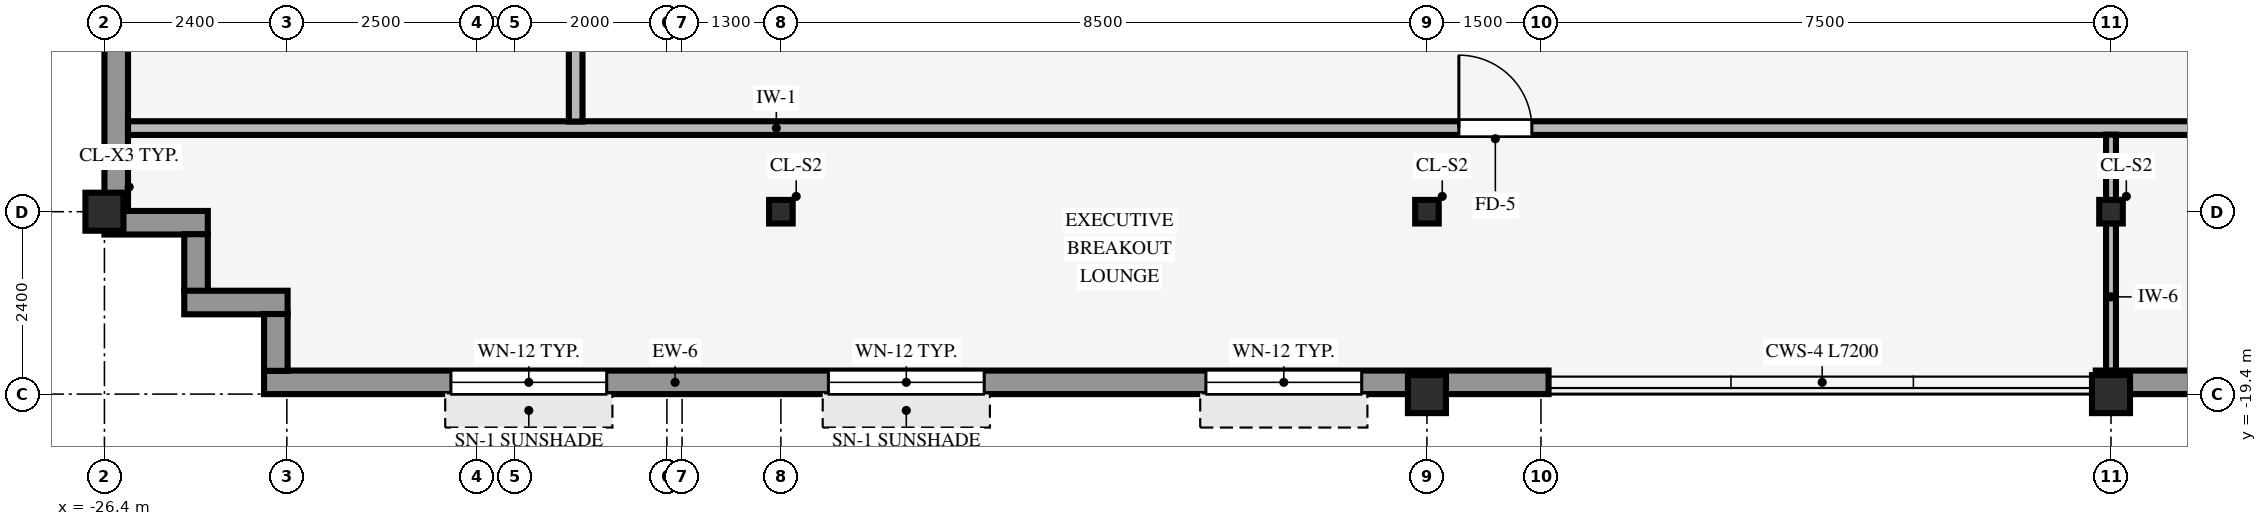
"""IFC4 building model, lengths in metres.
Left out: names, types, materials, properties, quantities, classifications, styles, units other than length and angle.
Written with IfcOpenShell. Run it as: python <this file> out.ifc"""

import sys

from ifc_helpers import new_model, si_unit, direction, frame, frame_2d, origin, origin_2d, place, context, subcontext, project, spatial, rectangle, hollow_rectangle, i_section, extrude, source, transform, mapped, element, fill, save


model = new_model("IFC4")
c1 = context("Model", 3, precision=1e-05, world=origin(), true_north=direction((0.0, 1.0)))
c2 = subcontext(c1, "Body", "Model", "MODEL_VIEW")
j1 = project(units=[si_unit("LENGTHUNIT", "METRE"), si_unit("PLANEANGLEUNIT", "RADIAN")], contexts=[c1])
p1 = place(None, origin())
s1 = spatial("IfcSite", under=j1, at=p1, CompositionType="ELEMENT")
p2 = place(p1, origin())
s2 = spatial("IfcBuilding", under=s1, at=p2, CompositionType="ELEMENT")
p3 = place(p2, frame((0.0, 0.0, 223.75)))
s3 = spatial("IfcBuildingStorey", under=s2, at=p3, CompositionType="ELEMENT", Elevation=223.75)
for number, where, z_axis, x_axis in (
    (1, (-26.4, -17.0, 0.0), (0.0, 0.0, 1.0), (1.0, 0.0, 0.0)),
    (2, (-9.0, -19.4, 0.0), (0.0, 0.0, 1.0), (1.0, 0.0, 0.0)),
    (3, (0.0, -19.4, 0.0), (0.0, 0.0, 1.0), (1.0, 0.0, 0.0)),
):
    element("IfcColumn", number, at=place(p3, frame(where, z_axis=z_axis, x_axis=x_axis)), inside=s3, PredefinedType="COLUMN", context=c2, shape_type="SweptSolid", body=[
        extrude(hollow_rectangle(XDim=0.5, YDim=0.5, WallThickness=0.032, InnerFilletRadius=0.032, OuterFilletRadius=0.064, at=origin_2d()), origin(), (0.0, 0.0, 1.0), 3.37),
    ])
for number, where, z_axis, x_axis in (
    (4, (0.0, -17.0, 0.0), (0.0, 0.0, 1.0), (1.0, 0.0, 0.0)),
    (5, (-17.5, -17.0, 0.0), (0.0, 0.0, 1.0), (1.0, 0.0, 0.0)),
    (6, (-9.0, -17.0, 0.0), (0.0, 0.0, 1.0), (1.0, 0.0, 0.0)),
):
    element("IfcColumn", number, at=place(p3, frame(where, z_axis=z_axis, x_axis=x_axis)), inside=s3, PredefinedType="COLUMN", context=c2, shape_type="SweptSolid", body=[
        extrude(i_section(OverallWidth=0.31, OverallDepth=0.31, WebThickness=0.015, FlangeThickness=0.015, FilletRadius=0.015, at=origin_2d()), origin(), (0.0, 0.0, 1.0), 3.37),
    ])
p4 = place(p3, frame((-24.3, -19.245, 0.0), z_axis=(0.0, 0.0, 1.0), x_axis=(1.0, 0.0, 0.0)))
e7 = element("IfcWall", 7, at=p4, inside=s3, PredefinedType="STANDARD", context=c2, shape_type="SweptSolid", body=[
    extrude(rectangle(XDim=16.9, YDim=0.31, at=frame_2d((8.45, 0.0))), origin(), (0.0, 0.0, 1.0), 2.705),
])
p5 = place(p4, frame((2.458, 0.0, 0.8)))
e8 = element("IfcOpeningElement", 8, at=p5, cuts=e7, PredefinedType="OPENING", context=c2, shape_type="SweptSolid", body=[
    extrude(rectangle(XDim=2.05, YDim=1.52, at=frame_2d((1.025, 0.76))), frame((0.0, 0.165, 0.0), z_axis=(0.0, -1.0, 0.0), x_axis=(1.0, 0.0, 0.0)), (0.0, 0.0, 1.0), 0.33),
])
p6 = place(p4, frame((7.425, 0.0, 0.8)))
e9 = element("IfcOpeningElement", 9, at=p6, cuts=e7, PredefinedType="OPENING", context=c2, shape_type="SweptSolid", body=[
    extrude(rectangle(XDim=2.05, YDim=1.52, at=frame_2d((1.025, 0.76))), frame((0.0, 0.165, 0.0), z_axis=(0.0, -1.0, 0.0), x_axis=(1.0, 0.0, 0.0)), (0.0, 0.0, 1.0), 0.33),
])
p7 = place(p4, frame((12.392, 0.0, 0.8)))
e10 = element("IfcOpeningElement", 10, at=p7, cuts=e7, PredefinedType="OPENING", context=c2, shape_type="SweptSolid", body=[
    extrude(rectangle(XDim=2.05, YDim=1.52, at=frame_2d((1.025, 0.76))), frame((0.0, 0.165, 0.0), z_axis=(0.0, -1.0, 0.0), x_axis=(1.0, 0.0, 0.0)), (0.0, 0.0, 1.0), 0.33),
])
p8 = place(p3, frame((-0.2, -19.245, 0.0), z_axis=(0.0, 0.0, 1.0), x_axis=(1.0, 0.0, 0.0)))
e11 = element("IfcWall", 11, at=p8, inside=s3, PredefinedType="STANDARD", context=c2, shape_type="SweptSolid", body=[
    extrude(rectangle(XDim=16.9, YDim=0.31, at=frame_2d((8.45, 0.0))), origin(), (0.0, 0.0, 1.0), 2.705),
])
p9 = place(p8, frame((2.458, 0.0, 0.8)))
e12 = element("IfcOpeningElement", 12, at=p9, cuts=e11, PredefinedType="OPENING", context=c2, shape_type="SweptSolid", body=[
    extrude(rectangle(XDim=2.05, YDim=1.52, at=frame_2d((1.025, 0.76))), frame((0.0, 0.165, 0.0), z_axis=(0.0, -1.0, 0.0), x_axis=(1.0, 0.0, 0.0)), (0.0, 0.0, 1.0), 0.33),
])
p10 = place(p8, frame((6.075, 0.0, 0.8)))
e13 = element("IfcOpeningElement", 13, at=p10, cuts=e11, PredefinedType="OPENING", context=c2, shape_type="SweptSolid", body=[
    extrude(rectangle(XDim=2.05, YDim=1.52, at=frame_2d((1.025, 0.76))), frame((0.0, 0.165, 0.0), z_axis=(0.0, -1.0, 0.0), x_axis=(1.0, 0.0, 0.0)), (0.0, 0.0, 1.0), 0.33),
])
p11 = place(p8, frame((12.392, 0.0, 0.8)))
e14 = element("IfcOpeningElement", 14, at=p11, cuts=e11, PredefinedType="OPENING", context=c2, shape_type="SweptSolid", body=[
    extrude(rectangle(XDim=2.05, YDim=1.52, at=frame_2d((1.025, 0.76))), frame((0.0, 0.165, 0.0), z_axis=(0.0, -1.0, 0.0), x_axis=(1.0, 0.0, 0.0)), (0.0, 0.0, 1.0), 0.33),
])
p12 = place(p3, frame((-26.245, -16.994, 0.0), z_axis=(0.0, 0.0, 1.0), x_axis=(0.0, 1.0, 0.0)))
e15 = element("IfcWall", 15, at=p12, inside=s3, PredefinedType="STANDARD", context=c2, shape_type="SweptSolid", body=[
    extrude(rectangle(XDim=33.988, YDim=0.31, at=frame_2d((16.994, 0.0))), origin(), (0.0, 0.0, 1.0), 2.705),
])
p13 = place(p12, frame((21.194, 0.0, 0.0)))
e16 = element("IfcOpeningElement", 16, at=p13, cuts=e15, PredefinedType="OPENING", context=c2, shape_type="SweptSolid", body=[
    extrude(rectangle(XDim=1.05, YDim=2.1, at=frame_2d((0.525, 1.05))), frame((0.0, 0.165, 0.0), z_axis=(0.0, -1.0, 0.0), x_axis=(1.0, 0.0, 0.0)), (0.0, 0.0, 1.0), 0.33),
])
p14 = place(p12, frame((2.66, 0.0, 0.8)))
e17 = element("IfcOpeningElement", 17, at=p14, cuts=e15, PredefinedType="OPENING", context=c2, shape_type="SweptSolid", body=[
    extrude(rectangle(XDim=1.25, YDim=1.52, at=frame_2d((0.625, 0.76))), frame((0.0, 0.165, 0.0), z_axis=(0.0, -1.0, 0.0), x_axis=(1.0, 0.0, 0.0)), (0.0, 0.0, 1.0), 0.33),
])
p15 = place(p12, frame((8.13, 0.0, 0.8)))
e18 = element("IfcOpeningElement", 18, at=p15, cuts=e15, PredefinedType="OPENING", context=c2, shape_type="SweptSolid", body=[
    extrude(rectangle(XDim=1.25, YDim=1.52, at=frame_2d((0.625, 0.76))), frame((0.0, 0.165, 0.0), z_axis=(0.0, -1.0, 0.0), x_axis=(1.0, 0.0, 0.0)), (0.0, 0.0, 1.0), 0.33),
])
p16 = place(p12, frame((11.799, 0.0, 0.8)))
e19 = element("IfcOpeningElement", 19, at=p16, cuts=e15, PredefinedType="OPENING", context=c2, shape_type="SweptSolid", body=[
    extrude(rectangle(XDim=1.25, YDim=1.52, at=frame_2d((0.625, 0.76))), frame((0.0, 0.165, 0.0), z_axis=(0.0, -1.0, 0.0), x_axis=(1.0, 0.0, 0.0)), (0.0, 0.0, 1.0), 0.33),
])
p17 = place(p12, frame((17.719, 0.0, 0.8)))
e20 = element("IfcOpeningElement", 20, at=p17, cuts=e15, PredefinedType="OPENING", context=c2, shape_type="SweptSolid", body=[
    extrude(rectangle(XDim=1.25, YDim=1.52, at=frame_2d((0.625, 0.76))), frame((0.0, 0.165, 0.0), z_axis=(0.0, -1.0, 0.0), x_axis=(1.0, 0.0, 0.0)), (0.0, 0.0, 1.0), 0.33),
])
p18 = place(p12, frame((19.589, 0.0, 0.8)))
e21 = element("IfcOpeningElement", 21, at=p18, cuts=e15, PredefinedType="OPENING", context=c2, shape_type="SweptSolid", body=[
    extrude(rectangle(XDim=1.25, YDim=1.52, at=frame_2d((0.625, 0.76))), frame((0.0, 0.165, 0.0), z_axis=(0.0, -1.0, 0.0), x_axis=(1.0, 0.0, 0.0)), (0.0, 0.0, 1.0), 0.33),
])
p19 = place(p12, frame((24.608, 0.0, 0.8)))
e22 = element("IfcOpeningElement", 22, at=p19, cuts=e15, PredefinedType="OPENING", context=c2, shape_type="SweptSolid", body=[
    extrude(rectangle(XDim=1.25, YDim=1.52, at=frame_2d((0.625, 0.76))), frame((0.0, 0.165, 0.0), z_axis=(0.0, -1.0, 0.0), x_axis=(1.0, 0.0, 0.0)), (0.0, 0.0, 1.0), 0.33),
])
p20 = place(p12, frame((30.078, 0.0, 0.8)))
e23 = element("IfcOpeningElement", 23, at=p20, cuts=e15, PredefinedType="OPENING", context=c2, shape_type="SweptSolid", body=[
    extrude(rectangle(XDim=1.25, YDim=1.52, at=frame_2d((0.625, 0.76))), frame((0.0, 0.165, 0.0), z_axis=(0.0, -1.0, 0.0), x_axis=(1.0, 0.0, 0.0)), (0.0, 0.0, 1.0), 0.33),
])
p21 = place(p3, frame((-26.4, -17.145, 0.0), z_axis=(0.0, 0.0, 1.0), x_axis=(1.0, 0.0, 0.0)))
e24 = element("IfcWall", 24, at=p21, inside=s3, PredefinedType="STANDARD", context=c2, shape_type="SweptSolid", body=[
    extrude(rectangle(XDim=1.36, YDim=0.31, at=frame_2d((0.68, 0.0))), origin(), (0.0, 0.0, 1.0), 2.892),
])
p22 = place(p3, frame((-25.195, -18.044, 0.0), z_axis=(0.0, 0.0, 1.0), x_axis=(0.0, 1.0, 0.0)))
e25 = element("IfcWall", 25, at=p22, inside=s3, PredefinedType="STANDARD", context=c2, shape_type="SweptSolid", body=[
    extrude(rectangle(XDim=0.748, YDim=0.31, at=frame_2d((0.374, 0.0))), origin(), (0.0, 0.0, 1.0), 2.892),
])
p23 = place(p3, frame((-25.35, -18.195, 0.0), z_axis=(0.0, 0.0, 1.0), x_axis=(1.0, 0.0, 0.0)))
e26 = element("IfcWall", 26, at=p23, inside=s3, PredefinedType="STANDARD", context=c2, shape_type="SweptSolid", body=[
    extrude(rectangle(XDim=1.36, YDim=0.31, at=frame_2d((0.68, 0.0))), origin(), (0.0, 0.0, 1.0), 2.892),
])
p24 = place(p3, frame((-24.145, -19.094, 0.0), z_axis=(0.0, 0.0, 1.0), x_axis=(0.0, 1.0, 0.0)))
e27 = element("IfcWall", 27, at=p24, inside=s3, PredefinedType="STANDARD", context=c2, shape_type="SweptSolid", body=[
    extrude(rectangle(XDim=0.748, YDim=0.31, at=frame_2d((0.374, 0.0))), origin(), (0.0, 0.0, 1.0), 2.892),
])
p25 = place(p3, frame((-26.09, -15.9, 0.0), z_axis=(0.0, 0.0, 1.0), x_axis=(1.0, 0.0, 0.0)))
e28 = element("IfcWall", 28, at=p25, inside=s3, PredefinedType="PARTITIONING", context=c2, shape_type="SweptSolid", body=[
    extrude(rectangle(XDim=35.09, YDim=0.18, at=frame_2d((17.545, 0.0))), origin(), (0.0, 0.0, 1.0), 3.36),
])
p26 = place(p25, frame((17.51, 0.0, 0.0)))
e29 = element("IfcOpeningElement", 29, at=p26, cuts=e28, PredefinedType="OPENING", context=c2, shape_type="SweptSolid", body=[
    extrude(rectangle(XDim=0.96, YDim=2.1, at=frame_2d((0.48, 1.05))), frame((0.0, 0.1, 0.0), z_axis=(0.0, -1.0, 0.0), x_axis=(1.0, 0.0, 0.0)), (0.0, 0.0, 1.0), 0.2),
])
p27 = place(p25, frame((28.91, 0.0, 0.0)))
e30 = element("IfcOpeningElement", 30, at=p27, cuts=e28, PredefinedType="OPENING", context=c2, shape_type="SweptSolid", body=[
    extrude(rectangle(XDim=0.96, YDim=2.1, at=frame_2d((0.48, 1.05))), frame((0.0, 0.1, 0.0), z_axis=(0.0, -1.0, 0.0), x_axis=(1.0, 0.0, 0.0)), (0.0, 0.0, 1.0), 0.2),
])
p28 = place(p3, frame((-20.2, -15.814, 0.0), z_axis=(0.0, 0.0, 1.0), x_axis=(0.0, 1.0, 0.0)))
e31 = element("IfcWall", 31, at=p28, inside=s3, PredefinedType="PARTITIONING", context=c2, shape_type="SweptSolid", body=[
    extrude(rectangle(XDim=31.628, YDim=0.18, at=frame_2d((15.814, 0.0))), origin(), (0.0, 0.0, 1.0), 3.36),
])
p29 = place(p28, frame((15.334, 0.0, 0.0)))
e32 = element("IfcOpeningElement", 32, at=p29, cuts=e31, PredefinedType="OPENING", context=c2, shape_type="SweptSolid", body=[
    extrude(rectangle(XDim=0.96, YDim=2.1, at=frame_2d((0.48, 1.05))), frame((0.0, 0.1, 0.0), z_axis=(0.0, -1.0, 0.0), x_axis=(1.0, 0.0, 0.0)), (0.0, 0.0, 1.0), 0.2),
])
p30 = place(p3, frame((0.0, -19.09, 0.0), z_axis=(0.0, 0.0, 1.0), x_axis=(0.0, 1.0, 0.0)))
e33 = element("IfcWall", 33, at=p30, inside=s3, PredefinedType="PARTITIONING", context=c2, shape_type="SweptSolid", body=[
    extrude(rectangle(XDim=1.939, YDim=0.13, at=frame_2d((0.97, 0.0))), origin(), (0.0, 0.0, 1.0), 2.892),
])
p31 = place(p3, frame((0.0, -16.849, 0.0), z_axis=(0.0, 0.0, 1.0), x_axis=(0.0, 1.0, 0.0)))
e34 = element("IfcWall", 34, at=p31, inside=s3, PredefinedType="PARTITIONING", context=c2, shape_type="SweptSolid", body=[
    extrude(rectangle(XDim=0.863, YDim=0.13, at=frame_2d((0.432, 0.0))), origin(), (0.0, 0.0, 1.0), 2.892),
])
m1 = source(origin(), c2, "Body", "SweptSolid", [
    extrude(rectangle(XDim=2.05, YDim=1.52, at=frame_2d((1.025, 0.76))), frame((0.0, 0.03, 0.0), z_axis=(0.0, -1.0, 0.0), x_axis=(1.0, 0.0, 0.0)), (0.0, 0.0, 1.0), 0.06),
])
p32 = place(p5, origin())
e35 = element("IfcWindow", 35, at=p32, inside=s3, PartitioningType="SINGLE_PANEL", PredefinedType="WINDOW", context=c2, shape_type="MappedRepresentation", body=[
    mapped(m1, transform((0.0, 0.0, 0.0), scale=1.0)),
])
fill(e8, e35)
p33 = place(p6, origin())
e36 = element("IfcWindow", 36, at=p33, inside=s3, PartitioningType="SINGLE_PANEL", PredefinedType="WINDOW", context=c2, shape_type="MappedRepresentation", body=[
    mapped(m1, transform((0.0, 0.0, 0.0), scale=1.0)),
])
fill(e9, e36)
p34 = place(p7, origin())
e37 = element("IfcWindow", 37, at=p34, inside=s3, PartitioningType="SINGLE_PANEL", PredefinedType="WINDOW", context=c2, shape_type="MappedRepresentation", body=[
    mapped(m1, transform((0.0, 0.0, 0.0), scale=1.0)),
])
fill(e10, e37)
m2 = source(origin(), c2, "Body", "SweptSolid", [
    extrude(rectangle(XDim=0.96, YDim=2.1, at=frame_2d((0.48, 1.05))), frame((0.0, 0.025, 0.0), z_axis=(0.0, -1.0, 0.0), x_axis=(1.0, 0.0, 0.0)), (0.0, 0.0, 1.0), 0.05),
])
p35 = place(p26, origin())
e38 = element("IfcDoor", 38, at=p35, inside=s3, OperationType="SINGLE_SWING_LEFT", PredefinedType="DOOR", context=c2, shape_type="MappedRepresentation", body=[
    mapped(m2, transform((0.0, 0.0, 0.0), scale=1.0)),
])
fill(e29, e38)
save(model, sys.argv[1])
